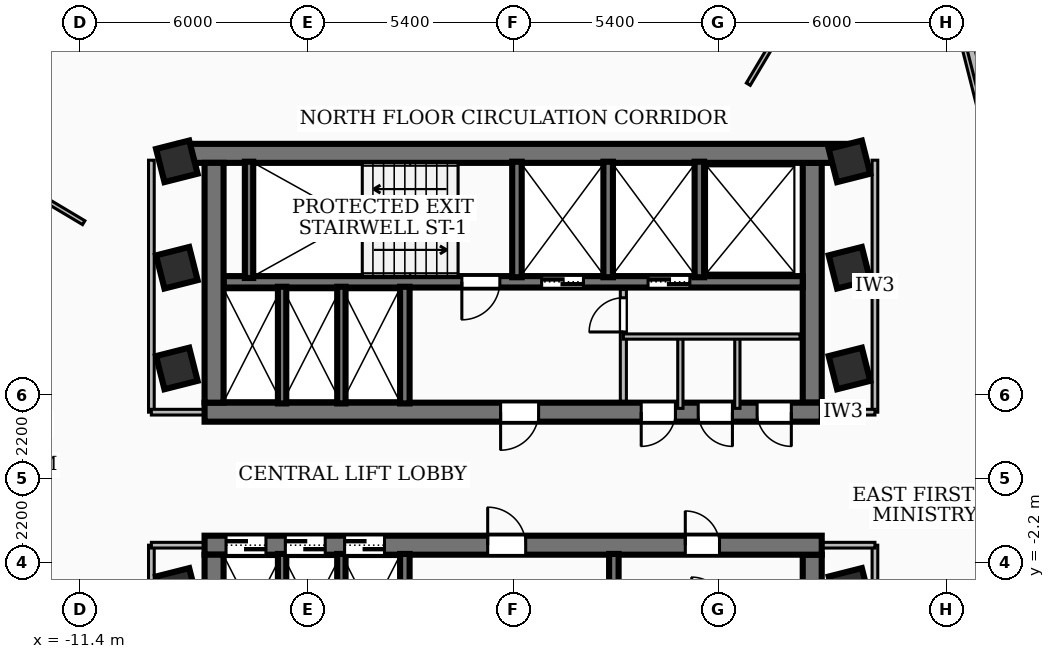
"""IFC4 building model, lengths in metres.
Left out: names, types, materials, properties, quantities, classifications, styles, units other than length and angle.
Written with IfcOpenShell. Run it as: python <this file> out.ifc"""

import sys

from ifc_helpers import new_model, si_unit, direction, frame, frame_2d, origin, origin_2d, place, context, subcontext, project, spatial, rectangle, extrude, element, fill, save


model = new_model("IFC4")
c1 = context("Model", 3, precision=1e-05, world=origin(), true_north=direction((0.0, 1.0)))
c2 = subcontext(c1, "Body", "Model", "MODEL_VIEW")
j1 = project(units=[si_unit("LENGTHUNIT", "METRE"), si_unit("PLANEANGLEUNIT", "RADIAN")], contexts=[c1])
p1 = place(None, origin())
s1 = spatial("IfcSite", under=j1, at=p1, CompositionType="ELEMENT")
p2 = place(p1, origin())
s2 = spatial("IfcBuilding", under=s1, at=p2, CompositionType="ELEMENT")
p3 = place(p2, frame((0.0, 0.0, 127.08)))
s3 = spatial("IfcBuildingStorey", under=s2, at=p3, CompositionType="ELEMENT", Elevation=127.08)
p4 = place(p3, frame((-8.78, 8.56, 0.0), z_axis=(0.0, 0.0, 1.0), x_axis=(1.0, 0.0, 0.0)))
e1 = element("IfcWall", 1, at=p4, inside=s3, PredefinedType="SHEAR", context=c2, shape_type="SweptSolid", body=[
    extrude(rectangle(XDim=17.56, YDim=0.5, at=frame_2d((8.78, 0.0))), origin(), (0.0, 0.0, 1.0), 3.34),
])
p5 = place(p3, frame((8.12, 1.75, 0.0), z_axis=(0.0, 0.0, 1.0), x_axis=(-1.0, 0.0, 0.0)))
e2 = element("IfcWall", 2, at=p5, inside=s3, PredefinedType="SHEAR", context=c2, shape_type="SweptSolid", body=[
    extrude(rectangle(XDim=16.24, YDim=0.5, at=frame_2d((8.12, 0.0))), origin(), (0.0, 0.0, 1.0), 3.34),
])
p6 = place(p5, frame((7.45, 0.0, 0.0)))
e3 = element("IfcOpeningElement", 3, at=p6, cuts=e2, PredefinedType="OPENING", context=c2, shape_type="SweptSolid", body=[
    extrude(rectangle(XDim=1.0, YDim=2.1, at=frame_2d((0.5, 1.05))), frame((0.0, 0.26, 0.0), z_axis=(0.0, -1.0, 0.0), x_axis=(1.0, 0.0, 0.0)), (0.0, 0.0, 1.0), 0.52),
])
p7 = place(p5, frame((3.85, 0.0, 0.0)))
e4 = element("IfcOpeningElement", 4, at=p7, cuts=e2, PredefinedType="OPENING", context=c2, shape_type="SweptSolid", body=[
    extrude(rectangle(XDim=0.9, YDim=2.06, at=frame_2d((0.45, 1.03))), frame((0.0, 0.26, 0.0), z_axis=(0.0, -1.0, 0.0), x_axis=(1.0, 0.0, 0.0)), (0.0, 0.0, 1.0), 0.52),
])
p8 = place(p5, frame((2.35, 0.0, 0.0)))
e5 = element("IfcOpeningElement", 5, at=p8, cuts=e2, PredefinedType="OPENING", context=c2, shape_type="SweptSolid", body=[
    extrude(rectangle(XDim=0.9, YDim=2.06, at=frame_2d((0.45, 1.03))), frame((0.0, 0.26, 0.0), z_axis=(0.0, -1.0, 0.0), x_axis=(1.0, 0.0, 0.0)), (0.0, 0.0, 1.0), 0.52),
])
p9 = place(p5, frame((0.8, 0.0, 0.0)))
e6 = element("IfcOpeningElement", 6, at=p9, cuts=e2, PredefinedType="OPENING", context=c2, shape_type="SweptSolid", body=[
    extrude(rectangle(XDim=0.9, YDim=2.06, at=frame_2d((0.45, 1.03))), frame((0.0, 0.26, 0.0), z_axis=(0.0, -1.0, 0.0), x_axis=(1.0, 0.0, 0.0)), (0.0, 0.0, 1.0), 0.52),
])
for number, where, z_axis, x_axis in (
    (7, (-7.87, 2.0, 0.0), (0.0, 0.0, 1.0), (0.0, 1.0, 0.0)),
    (8, (7.87, 8.31, 0.0), (0.0, 0.0, 1.0), (0.0, -1.0, 0.0)),
):
    element("IfcWall", number, at=place(p3, frame(where, z_axis=z_axis, x_axis=x_axis)), inside=s3, PredefinedType="SHEAR", context=c2, shape_type="SweptSolid", body=[
        extrude(rectangle(XDim=6.31, YDim=0.5, at=frame_2d((3.155, 0.0))), origin(), (0.0, 0.0, 1.0), 3.34),
    ])
p10 = place(p3, frame((7.62, 5.18, 0.0), z_axis=(0.0, 0.0, 1.0), x_axis=(-1.0, 0.0, 0.0)))
e9 = element("IfcWall", 9, at=p10, inside=s3, PredefinedType="SOLIDWALL", context=c2, shape_type="SweptSolid", body=[
    extrude(rectangle(XDim=15.24, YDim=0.3, at=frame_2d((7.62, 0.0))), origin(), (0.0, 0.0, 1.0), 3.34),
])
p11 = place(p10, frame((5.77, 0.0, 0.0)))
e10 = element("IfcOpeningElement", 10, at=p11, cuts=e9, PredefinedType="OPENING", context=c2, shape_type="SweptSolid", body=[
    extrude(rectangle(XDim=1.1, YDim=2.15, at=frame_2d((0.55, 1.075))), frame((0.0, 0.16, 0.0), z_axis=(0.0, -1.0, 0.0), x_axis=(1.0, 0.0, 0.0)), (0.0, 0.0, 1.0), 0.32),
])
p12 = place(p10, frame((2.97, 0.0, 0.0)))
e11 = element("IfcOpeningElement", 11, at=p12, cuts=e9, PredefinedType="OPENING", context=c2, shape_type="SweptSolid", body=[
    extrude(rectangle(XDim=1.1, YDim=2.15, at=frame_2d((0.55, 1.075))), frame((0.0, 0.16, 0.0), z_axis=(0.0, -1.0, 0.0), x_axis=(1.0, 0.0, 0.0)), (0.0, 0.0, 1.0), 0.32),
])
p13 = place(p10, frame((7.97, 0.0, 0.0)))
e12 = element("IfcOpeningElement", 12, at=p13, cuts=e9, PredefinedType="OPENING", context=c2, shape_type="SweptSolid", body=[
    extrude(rectangle(XDim=1.0, YDim=2.1, at=frame_2d((0.5, 1.05))), frame((0.0, 0.16, 0.0), z_axis=(0.0, -1.0, 0.0), x_axis=(1.0, 0.0, 0.0)), (0.0, 0.0, 1.0), 0.32),
])
p14 = place(p3, frame((-8.12, -1.75, 0.0), z_axis=(0.0, 0.0, 1.0), x_axis=(1.0, 0.0, 0.0)))
e13 = element("IfcWall", 13, at=p14, inside=s3, PredefinedType="SHEAR", context=c2, shape_type="SweptSolid", body=[
    extrude(rectangle(XDim=16.24, YDim=0.5, at=frame_2d((8.12, 0.0))), origin(), (0.0, 0.0, 1.0), 3.34),
])
p15 = place(p14, frame((7.45, 0.0, 0.0)))
e14 = element("IfcOpeningElement", 14, at=p15, cuts=e13, PredefinedType="OPENING", context=c2, shape_type="SweptSolid", body=[
    extrude(rectangle(XDim=1.0, YDim=2.1, at=frame_2d((0.5, 1.05))), frame((0.0, 0.26, 0.0), z_axis=(0.0, -1.0, 0.0), x_axis=(1.0, 0.0, 0.0)), (0.0, 0.0, 1.0), 0.52),
])
p16 = place(p14, frame((12.65, 0.0, 0.0)))
e15 = element("IfcOpeningElement", 15, at=p16, cuts=e13, PredefinedType="OPENING", context=c2, shape_type="SweptSolid", body=[
    extrude(rectangle(XDim=0.9, YDim=2.06, at=frame_2d((0.45, 1.03))), frame((0.0, 0.26, 0.0), z_axis=(0.0, -1.0, 0.0), x_axis=(1.0, 0.0, 0.0)), (0.0, 0.0, 1.0), 0.52),
])
p17 = place(p14, frame((0.565, 0.0, 0.0)))
e16 = element("IfcOpeningElement", 16, at=p17, cuts=e13, PredefinedType="OPENING", context=c2, shape_type="SweptSolid", body=[
    extrude(rectangle(XDim=1.05, YDim=2.15, at=frame_2d((0.525, 1.075))), frame((0.0, 0.26, 0.0), z_axis=(0.0, -1.0, 0.0), x_axis=(1.0, 0.0, 0.0)), (0.0, 0.0, 1.0), 0.52),
])
p18 = place(p14, frame((2.125, 0.0, 0.0)))
e17 = element("IfcOpeningElement", 17, at=p18, cuts=e13, PredefinedType="OPENING", context=c2, shape_type="SweptSolid", body=[
    extrude(rectangle(XDim=1.05, YDim=2.15, at=frame_2d((0.525, 1.075))), frame((0.0, 0.26, 0.0), z_axis=(0.0, -1.0, 0.0), x_axis=(1.0, 0.0, 0.0)), (0.0, 0.0, 1.0), 0.52),
])
p19 = place(p14, frame((3.685, 0.0, 0.0)))
e18 = element("IfcOpeningElement", 18, at=p19, cuts=e13, PredefinedType="OPENING", context=c2, shape_type="SweptSolid", body=[
    extrude(rectangle(XDim=1.05, YDim=2.15, at=frame_2d((0.525, 1.075))), frame((0.0, 0.26, 0.0), z_axis=(0.0, -1.0, 0.0), x_axis=(1.0, 0.0, 0.0)), (0.0, 0.0, 1.0), 0.52),
])
for number, where, z_axis, x_axis in (
    (19, (-7.87, -8.31, 0.0), (0.0, 0.0, 1.0), (0.0, 1.0, 0.0)),
    (20, (7.87, -2.0, 0.0), (0.0, 0.0, 1.0), (0.0, -1.0, 0.0)),
):
    element("IfcWall", number, at=place(p3, frame(where, z_axis=z_axis, x_axis=x_axis)), inside=s3, PredefinedType="SHEAR", context=c2, shape_type="SweptSolid", body=[
        extrude(rectangle(XDim=6.31, YDim=0.5, at=frame_2d((3.155, 0.0))), origin(), (0.0, 0.0, 1.0), 3.34),
    ])
p20 = place(p3, frame((-6.95, 5.28, 0.0), z_axis=(0.0, 0.0, 1.0), x_axis=(0.0, 1.0, 0.0)))
e21 = element("IfcWall", 21, at=p20, inside=s3, PredefinedType="SOLIDWALL", context=c2, shape_type="SweptSolid", body=[
    extrude(rectangle(XDim=3.06, YDim=0.22, at=frame_2d((1.53, 0.0))), origin(), (0.0, 0.0, 1.0), 3.34),
])
for number, where, z_axis, x_axis in (
    (22, (0.1, 5.3, 0.0), (0.0, 0.0, 1.0), (0.0, 1.0, 0.0)),
    (23, (2.5, 5.3, 0.0), (0.0, 0.0, 1.0), (0.0, 1.0, 0.0)),
    (24, (4.9, 5.3, 0.0), (0.0, 0.0, 1.0), (0.0, 1.0, 0.0)),
):
    element("IfcWall", number, at=place(p3, frame(where, z_axis=z_axis, x_axis=x_axis)), inside=s3, PredefinedType="SOLIDWALL", context=c2, shape_type="SweptSolid", body=[
        extrude(rectangle(XDim=3.04, YDim=0.25, at=frame_2d((1.52, 0.0))), origin(), (0.0, 0.0, 1.0), 3.34),
    ])
for number, where, z_axis, x_axis in (
    (25, (-2.85, 1.98, 0.0), (0.0, 0.0, 1.0), (0.0, 1.0, 0.0)),
    (26, (-2.85, -5.05, 0.0), (0.0, 0.0, 1.0), (0.0, 1.0, 0.0)),
    (27, (2.65, -5.05, 0.0), (0.0, 0.0, 1.0), (0.0, 1.0, 0.0)),
):
    element("IfcWall", number, at=place(p3, frame(where, z_axis=z_axis, x_axis=x_axis)), inside=s3, PredefinedType="SOLIDWALL", context=c2, shape_type="SweptSolid", body=[
        extrude(rectangle(XDim=3.07, YDim=0.25, at=frame_2d((1.535, 0.0))), origin(), (0.0, 0.0, 1.0), 3.34),
    ])
for number, where, z_axis, x_axis in (
    (28, (-6.08, 1.98, 0.0), (0.0, 0.0, 1.0), (0.0, 1.0, 0.0)),
    (29, (-4.52, 1.98, 0.0), (0.0, 0.0, 1.0), (0.0, 1.0, 0.0)),
    (30, (-6.08, -5.05, 0.0), (0.0, 0.0, 1.0), (0.0, 1.0, 0.0)),
    (31, (-4.52, -5.05, 0.0), (0.0, 0.0, 1.0), (0.0, 1.0, 0.0)),
):
    element("IfcWall", number, at=place(p3, frame(where, z_axis=z_axis, x_axis=x_axis)), inside=s3, PredefinedType="SOLIDWALL", context=c2, shape_type="SweptSolid", body=[
        extrude(rectangle(XDim=3.07, YDim=0.22, at=frame_2d((1.535, 0.0))), origin(), (0.0, 0.0, 1.0), 3.34),
    ])
for number, where, z_axis, x_axis in (
    (32, (-8.85, -2.9, 0.0), (0.0, 0.0, 1.0), (0.969, 0.245, 0.0)),
    (33, (-8.85, 2.9, 0.0), (0.0, 0.0, 1.0), (0.969, 0.245, 0.0)),
    (34, (-8.85, 5.55, 0.0), (0.0, 0.0, 1.0), (0.969, 0.245, 0.0)),
    (35, (8.85, -2.9, 0.0), (0.0, 0.0, 1.0), (0.969, 0.245, 0.0)),
    (36, (8.85, 2.9, 0.0), (0.0, 0.0, 1.0), (0.969, 0.245, 0.0)),
    (37, (8.85, 5.55, 0.0), (0.0, 0.0, 1.0), (0.969, 0.245, 0.0)),
    (38, (-8.85, 8.35, 0.0), (0.0, 0.0, 1.0), (0.969, 0.245, 0.0)),
    (39, (8.85, 8.35, 0.0), (0.0, 0.0, 1.0), (0.969, 0.245, 0.0)),
):
    element("IfcColumn", number, at=place(p3, frame(where, z_axis=z_axis, x_axis=x_axis)), inside=s3, PredefinedType="COLUMN", context=c2, shape_type="SweptSolid", body=[
        extrude(rectangle(XDim=0.9, YDim=0.9, at=origin_2d()), origin(), (0.0, 0.0, 1.0), 3.6),
    ])
p21 = place(p3, frame((-16.107, 10.82, 0.0), z_axis=(0.0, 0.0, 1.0), x_axis=(0.969443674581, 0.245314006561, 0.0)))
e40 = element("IfcWall", 40, at=p21, inside=s3, PredefinedType="SOLIDWALL", context=c2, shape_type="SweptSolid", body=[
    extrude(rectangle(XDim=6.759, YDim=0.22, at=frame_2d((3.379, 0.0))), origin(), (0.0, 0.0, 1.0), 3.34),
])
p22 = place(p3, frame((10.82, 16.107, 0.0), z_axis=(0.0, 0.0, 1.0), x_axis=(0.245314006561, -0.969443674581, 0.0)))
e41 = element("IfcWall", 41, at=p22, inside=s3, PredefinedType="SOLIDWALL", context=c2, shape_type="SweptSolid", body=[
    extrude(rectangle(XDim=6.759, YDim=0.22, at=frame_2d((3.379, 0.0))), origin(), (0.0, 0.0, 1.0), 2.644),
])
p23 = place(p3, frame((2.9, 2.04, 0.0), z_axis=(0.0, 0.0, 1.0), x_axis=(0.0, 1.0, 0.0)))
e42 = element("IfcWall", 42, at=p23, inside=s3, PredefinedType="PARTITIONING", context=c2, shape_type="SweptSolid", body=[
    extrude(rectangle(XDim=2.94, YDim=0.16, at=frame_2d((1.47, 0.0))), origin(), (0.0, 0.0, 1.0), 2.57),
])
p24 = place(p23, frame((1.82, 0.0, 0.0)))
e43 = element("IfcOpeningElement", 43, at=p24, cuts=e42, PredefinedType="OPENING", context=c2, shape_type="SweptSolid", body=[
    extrude(rectangle(XDim=0.9, YDim=2.06, at=frame_2d((0.45, 1.03))), frame((0.0, 0.09, 0.0), z_axis=(0.0, -1.0, 0.0), x_axis=(1.0, 0.0, 0.0)), (0.0, 0.0, 1.0), 0.18),
])
p25 = place(p3, frame((2.9, 3.74, 0.0), z_axis=(0.0, 0.0, 1.0), x_axis=(1.0, 0.0, 0.0)))
e44 = element("IfcWall", 44, at=p25, inside=s3, PredefinedType="PARTITIONING", context=c2, shape_type="SweptSolid", body=[
    extrude(rectangle(XDim=4.65, YDim=0.138, at=frame_2d((2.325, 0.0))), origin(), (0.0, 0.0, 1.0), 3.34),
])
for number, where, z_axis, x_axis in (
    (45, (4.4, 1.85, 0.0), (0.0, 0.0, 1.0), (0.0, 1.0, 0.0)),
    (46, (5.9, 1.85, 0.0), (0.0, 0.0, 1.0), (0.0, 1.0, 0.0)),
):
    element("IfcWall", number, at=place(p3, frame(where, z_axis=z_axis, x_axis=x_axis)), inside=s3, PredefinedType="PARTITIONING", context=c2, shape_type="SweptSolid", body=[
        extrude(rectangle(XDim=1.89, YDim=0.138, at=frame_2d((0.945, 0.0))), origin(), (0.0, 0.0, 1.0), 2.57),
    ])
p26 = place(p3, frame((-9.52, 1.75, 0.0), z_axis=(0.0, 0.0, 1.0), x_axis=(0.0, 1.0, 0.0)))
e47 = element("IfcWall", 47, at=p26, inside=s3, PredefinedType="PARTITIONING", context=c2, shape_type="SweptSolid", body=[
    extrude(rectangle(XDim=6.63, YDim=0.15, at=frame_2d((3.315, 0.0))), origin(), (0.0, 0.0, 1.0), 2.57),
])
p27 = place(p3, frame((-7.85, 1.75, 0.0), z_axis=(0.0, 0.0, 1.0), x_axis=(-1.0, 0.0, 0.0)))
e48 = element("IfcWall", 48, at=p27, inside=s3, PredefinedType="PARTITIONING", context=c2, shape_type="SweptSolid", body=[
    extrude(rectangle(XDim=1.67, YDim=0.15, at=frame_2d((0.835, 0.0))), origin(), (0.0, 0.0, 1.0), 2.57),
])
p28 = place(p3, frame((-9.52, -8.38, 0.0), z_axis=(0.0, 0.0, 1.0), x_axis=(0.0, 1.0, 0.0)))
e49 = element("IfcWall", 49, at=p28, inside=s3, PredefinedType="PARTITIONING", context=c2, shape_type="SweptSolid", body=[
    extrude(rectangle(XDim=6.63, YDim=0.15, at=frame_2d((3.315, 0.0))), origin(), (0.0, 0.0, 1.0), 2.57),
])
p29 = place(p3, frame((-7.85, -1.75, 0.0), z_axis=(0.0, 0.0, 1.0), x_axis=(-1.0, 0.0, 0.0)))
e50 = element("IfcWall", 50, at=p29, inside=s3, PredefinedType="PARTITIONING", context=c2, shape_type="SweptSolid", body=[
    extrude(rectangle(XDim=1.67, YDim=0.15, at=frame_2d((0.835, 0.0))), origin(), (0.0, 0.0, 1.0), 2.57),
])
p30 = place(p3, frame((9.52, 1.75, 0.0), z_axis=(0.0, 0.0, 1.0), x_axis=(0.0, 1.0, 0.0)))
e51 = element("IfcWall", 51, at=p30, inside=s3, PredefinedType="PARTITIONING", context=c2, shape_type="SweptSolid", body=[
    extrude(rectangle(XDim=6.63, YDim=0.15, at=frame_2d((3.315, 0.0))), origin(), (0.0, 0.0, 1.0), 2.57),
])
p31 = place(p3, frame((7.85, 1.75, 0.0), z_axis=(0.0, 0.0, 1.0), x_axis=(1.0, 0.0, 0.0)))
e52 = element("IfcWall", 52, at=p31, inside=s3, PredefinedType="PARTITIONING", context=c2, shape_type="SweptSolid", body=[
    extrude(rectangle(XDim=1.67, YDim=0.15, at=frame_2d((0.835, 0.0))), origin(), (0.0, 0.0, 1.0), 2.57),
])
p32 = place(p3, frame((9.52, -8.38, 0.0), z_axis=(0.0, 0.0, 1.0), x_axis=(0.0, 1.0, 0.0)))
e53 = element("IfcWall", 53, at=p32, inside=s3, PredefinedType="PARTITIONING", context=c2, shape_type="SweptSolid", body=[
    extrude(rectangle(XDim=6.63, YDim=0.15, at=frame_2d((3.315, 0.0))), origin(), (0.0, 0.0, 1.0), 2.57),
])
p33 = place(p3, frame((7.85, -1.75, 0.0), z_axis=(0.0, 0.0, 1.0), x_axis=(1.0, 0.0, 0.0)))
e54 = element("IfcWall", 54, at=p33, inside=s3, PredefinedType="PARTITIONING", context=c2, shape_type="SweptSolid", body=[
    extrude(rectangle(XDim=1.67, YDim=0.15, at=frame_2d((0.835, 0.0))), origin(), (0.0, 0.0, 1.0), 2.57),
])
p34 = place(p3, frame((6.188, 10.38, 0.0), z_axis=(0.0, 0.0, 1.0), x_axis=(0.511972353143, 0.859001926434, 0.0)))
e55 = element("IfcWall", 55, at=p34, inside=s3, PredefinedType="PARTITIONING", context=c2, shape_type="SweptSolid", body=[
    extrude(rectangle(XDim=7.59, YDim=0.12, at=frame_2d((3.795, 0.0))), origin(), (0.0, 0.0, 1.0), 2.57),
])
p35 = place(p3, frame((-11.3, 6.736, 0.0), z_axis=(0.0, 0.0, 1.0), x_axis=(-0.858979599017, 0.512009812868, 0.0)))
e56 = element("IfcWall", 56, at=p35, inside=s3, PredefinedType="PARTITIONING", context=c2, shape_type="SweptSolid", body=[
    extrude(rectangle(XDim=6.519, YDim=0.12, at=frame_2d((3.26, 0.0))), origin(), (0.0, 0.0, 1.0), 3.34),
])
p36 = place(p3, frame((11.342, 13.433, 0.0), z_axis=(0.0, 0.0, 1.0), x_axis=(0.24525085526, -0.969459652587, 0.0)))
e57 = element("IfcWall", 57, at=p36, inside=s3, PredefinedType="PARTITIONING", context=c2, shape_type="SweptSolid", body=[
    extrude(rectangle(XDim=20.261, YDim=0.12, at=frame_2d((10.13, 0.0))), origin(), (0.0, 0.0, 1.0), 2.57),
])
p37 = place(p36, frame((9.64, 0.0, 0.0)))
e58 = element("IfcOpeningElement", 58, at=p37, cuts=e57, PredefinedType="OPENING", context=c2, shape_type="SweptSolid", body=[
    extrude(rectangle(XDim=1.2, YDim=2.1, at=frame_2d((0.6, 1.05))), frame((0.0, 0.07, 0.0), z_axis=(0.0, -1.0, 0.0), x_axis=(1.0, 0.0, 0.0)), (0.0, 0.0, 1.0), 0.14),
])
p38 = place(p3, frame((-11.342, -13.433, 0.0), z_axis=(0.0, 0.0, 1.0), x_axis=(-0.24525085526, 0.969459652587, 0.0)))
e59 = element("IfcWall", 59, at=p38, inside=s3, PredefinedType="PARTITIONING", context=c2, shape_type="SweptSolid", body=[
    extrude(rectangle(XDim=20.261, YDim=0.12, at=frame_2d((10.13, 0.0))), origin(), (0.0, 0.0, 1.0), 2.57),
])
p39 = place(p38, frame((9.64, 0.0, 0.0)))
e60 = element("IfcOpeningElement", 60, at=p39, cuts=e59, PredefinedType="OPENING", context=c2, shape_type="SweptSolid", body=[
    extrude(rectangle(XDim=1.2, YDim=2.1, at=frame_2d((0.6, 1.05))), frame((0.0, 0.07, 0.0), z_axis=(0.0, -1.0, 0.0), x_axis=(1.0, 0.0, 0.0)), (0.0, 0.0, 1.0), 0.14),
])
p40 = place(p6, origin())
e61 = element("IfcDoor", 61, at=p40, inside=s3, OperationType="SINGLE_SWING_RIGHT", PredefinedType="DOOR", context=c2, shape_type="SweptSolid", body=[
    extrude(rectangle(XDim=1.0, YDim=2.1, at=frame_2d((0.5, 1.05))), frame((0.0, 0.025, 0.0), z_axis=(0.0, -1.0, 0.0), x_axis=(1.0, 0.0, 0.0)), (0.0, 0.0, 1.0), 0.05),
])
fill(e3, e61)
p41 = place(p15, origin())
e62 = element("IfcDoor", 62, at=p41, inside=s3, OperationType="SINGLE_SWING_LEFT", PredefinedType="DOOR", context=c2, shape_type="SweptSolid", body=[
    extrude(rectangle(XDim=1.0, YDim=2.1, at=frame_2d((0.5, 1.05))), frame((0.0, 0.025, 0.0), z_axis=(0.0, -1.0, 0.0), x_axis=(1.0, 0.0, 0.0)), (0.0, 0.0, 1.0), 0.05),
])
fill(e14, e62)
p42 = place(p11, origin())
e63 = element("IfcDoor", 63, at=p42, inside=s3, OperationType="DOUBLE_DOOR_SLIDING", PredefinedType="DOOR", context=c2, shape_type="SweptSolid", body=[
    extrude(rectangle(XDim=1.1, YDim=2.15, at=frame_2d((0.55, 1.075))), frame((0.0, 0.025, 0.0), z_axis=(0.0, -1.0, 0.0), x_axis=(1.0, 0.0, 0.0)), (0.0, 0.0, 1.0), 0.05),
])
fill(e10, e63)
p43 = place(p12, origin())
e64 = element("IfcDoor", 64, at=p43, inside=s3, OperationType="DOUBLE_DOOR_SLIDING", PredefinedType="DOOR", context=c2, shape_type="SweptSolid", body=[
    extrude(rectangle(XDim=1.1, YDim=2.15, at=frame_2d((0.55, 1.075))), frame((0.0, 0.025, 0.0), z_axis=(0.0, -1.0, 0.0), x_axis=(1.0, 0.0, 0.0)), (0.0, 0.0, 1.0), 0.05),
])
fill(e11, e64)
p44 = place(p13, origin())
e65 = element("IfcDoor", 65, at=p44, inside=s3, OperationType="SINGLE_SWING_RIGHT", PredefinedType="DOOR", context=c2, shape_type="SweptSolid", body=[
    extrude(rectangle(XDim=1.0, YDim=2.1, at=frame_2d((0.5, 1.05))), frame((0.0, 0.025, 0.0), z_axis=(0.0, -1.0, 0.0), x_axis=(1.0, 0.0, 0.0)), (0.0, 0.0, 1.0), 0.05),
])
fill(e12, e65)
p45 = place(p16, origin())
e66 = element("IfcDoor", 66, at=p45, inside=s3, OperationType="SINGLE_SWING_LEFT", PredefinedType="DOOR", context=c2, shape_type="SweptSolid", body=[
    extrude(rectangle(XDim=0.9, YDim=2.06, at=frame_2d((0.45, 1.03))), frame((0.0, 0.025, 0.0), z_axis=(0.0, -1.0, 0.0), x_axis=(1.0, 0.0, 0.0)), (0.0, 0.0, 1.0), 0.05),
])
fill(e15, e66)
p46 = place(p17, origin())
e67 = element("IfcDoor", 67, at=p46, inside=s3, OperationType="DOUBLE_DOOR_SLIDING", PredefinedType="DOOR", context=c2, shape_type="SweptSolid", body=[
    extrude(rectangle(XDim=1.05, YDim=2.15, at=frame_2d((0.525, 1.075))), frame((0.0, 0.025, 0.0), z_axis=(0.0, -1.0, 0.0), x_axis=(1.0, 0.0, 0.0)), (0.0, 0.0, 1.0), 0.05),
])
fill(e16, e67)
p47 = place(p18, origin())
e68 = element("IfcDoor", 68, at=p47, inside=s3, OperationType="DOUBLE_DOOR_SLIDING", PredefinedType="DOOR", context=c2, shape_type="SweptSolid", body=[
    extrude(rectangle(XDim=1.05, YDim=2.15, at=frame_2d((0.525, 1.075))), frame((0.0, 0.025, 0.0), z_axis=(0.0, -1.0, 0.0), x_axis=(1.0, 0.0, 0.0)), (0.0, 0.0, 1.0), 0.05),
])
fill(e17, e68)
p48 = place(p19, origin())
e69 = element("IfcDoor", 69, at=p48, inside=s3, OperationType="DOUBLE_DOOR_SLIDING", PredefinedType="DOOR", context=c2, shape_type="SweptSolid", body=[
    extrude(rectangle(XDim=1.05, YDim=2.15, at=frame_2d((0.525, 1.075))), frame((0.0, 0.025, 0.0), z_axis=(0.0, -1.0, 0.0), x_axis=(1.0, 0.0, 0.0)), (0.0, 0.0, 1.0), 0.05),
])
fill(e18, e69)
p49 = place(p7, origin())
e70 = element("IfcDoor", 70, at=p49, inside=s3, OperationType="SINGLE_SWING_RIGHT", PredefinedType="DOOR", context=c2, shape_type="SweptSolid", body=[
    extrude(rectangle(XDim=0.9, YDim=2.06, at=frame_2d((0.45, 1.03))), frame((0.0, 0.025, 0.0), z_axis=(0.0, -1.0, 0.0), x_axis=(1.0, 0.0, 0.0)), (0.0, 0.0, 1.0), 0.05),
])
fill(e4, e70)
p50 = place(p8, origin())
e71 = element("IfcDoor", 71, at=p50, inside=s3, OperationType="SINGLE_SWING_LEFT", PredefinedType="DOOR", context=c2, shape_type="SweptSolid", body=[
    extrude(rectangle(XDim=0.9, YDim=2.06, at=frame_2d((0.45, 1.03))), frame((0.0, 0.025, 0.0), z_axis=(0.0, -1.0, 0.0), x_axis=(1.0, 0.0, 0.0)), (0.0, 0.0, 1.0), 0.05),
])
fill(e5, e71)
p51 = place(p9, origin())
e72 = element("IfcDoor", 72, at=p51, inside=s3, OperationType="SINGLE_SWING_LEFT", PredefinedType="DOOR", context=c2, shape_type="SweptSolid", body=[
    extrude(rectangle(XDim=0.9, YDim=2.06, at=frame_2d((0.45, 1.03))), frame((0.0, 0.025, 0.0), z_axis=(0.0, -1.0, 0.0), x_axis=(1.0, 0.0, 0.0)), (0.0, 0.0, 1.0), 0.05),
])
fill(e6, e72)
p52 = place(p24, origin())
e73 = element("IfcDoor", 73, at=p52, inside=s3, OperationType="SINGLE_SWING_LEFT", PredefinedType="DOOR", context=c2, shape_type="SweptSolid", body=[
    extrude(rectangle(XDim=0.9, YDim=2.06, at=frame_2d((0.45, 1.03))), frame((0.0, 0.025, 0.0), z_axis=(0.0, -1.0, 0.0), x_axis=(1.0, 0.0, 0.0)), (0.0, 0.0, 1.0), 0.05),
])
fill(e43, e73)
save(model, sys.argv[1])
